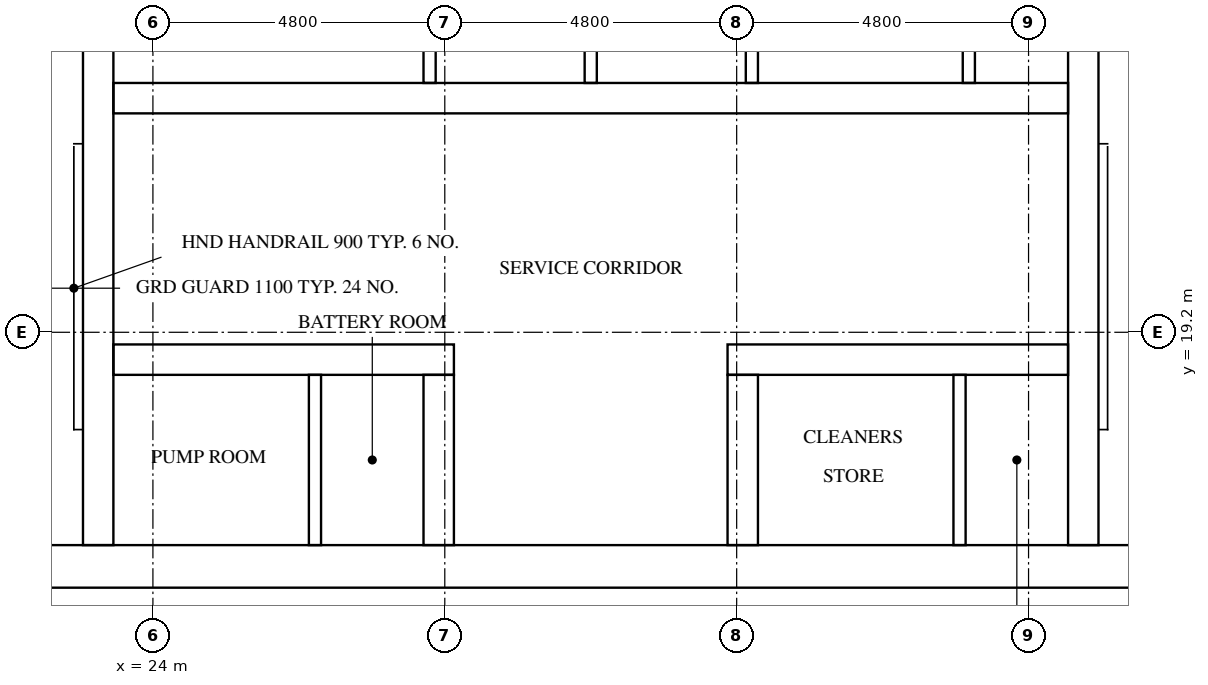
"""IFC4 building model, lengths in metres.
Left out: names, types, materials, properties, quantities, classifications, styles, units other than length and angle.
Written with IfcOpenShell. Run it as: python <this file> out.ifc"""

import sys

from ifc_helpers import new_model, si_unit, direction, frame, frame_2d, origin, place, context, subcontext, project, spatial, rectangle, extrude, element, fill, save


model = new_model("IFC4")
c1 = context("Model", 3, precision=1e-05, world=origin(), true_north=direction((0.0, 1.0)))
c2 = subcontext(c1, "Body", "Model", "MODEL_VIEW")
j1 = project(units=[si_unit("LENGTHUNIT", "METRE"), si_unit("PLANEANGLEUNIT", "RADIAN")], contexts=[c1])
p1 = place(None, origin())
s1 = spatial("IfcSite", under=j1, at=p1, CompositionType="ELEMENT")
p2 = place(p1, origin())
s2 = spatial("IfcBuilding", under=s1, at=p2, CompositionType="ELEMENT")
p3 = place(p2, frame((0.0, 0.0, 203.4)))
s3 = spatial("IfcBuildingStorey", under=s2, at=p3, CompositionType="ELEMENT", Elevation=203.4)
p4 = place(p3, frame((15.0, 15.35, 0.0), z_axis=(0.0, 0.0, 1.0), x_axis=(1.0, 0.0, 0.0)))
e1 = element("IfcWall", 1, at=p4, inside=s3, PredefinedType="SHEAR", context=c2, shape_type="SweptSolid", body=[
    extrude(rectangle(XDim=32.4, YDim=0.7, at=frame_2d((16.2, 0.0))), origin(), (0.0, 0.0, 1.0), 5.1),
])
p5 = place(p4, frame((15.3, 0.0, 0.0)))
e2 = element("IfcOpeningElement", 2, at=p5, cuts=e1, PredefinedType="OPENING", context=c2, shape_type="SweptSolid", body=[
    extrude(rectangle(XDim=1.8, YDim=2.1, at=frame_2d((0.9, 1.05))), frame((0.0, 0.36, 0.0), z_axis=(0.0, -1.0, 0.0), x_axis=(1.0, 0.0, 0.0)), (0.0, 0.0, 1.0), 0.72),
])
p6 = place(p3, frame((23.1, 15.7, 0.0), z_axis=(0.0, 0.0, 1.0), x_axis=(0.0, 1.0, 0.0)))
e3 = element("IfcWall", 3, at=p6, inside=s3, PredefinedType="SHEAR", context=c2, shape_type="SweptSolid", body=[
    extrude(rectangle(XDim=21.4, YDim=0.5, at=frame_2d((10.7, 0.0))), origin(), (0.0, 0.0, 1.0), 5.1),
])
p7 = place(p3, frame((39.3, 15.7, 0.0), z_axis=(0.0, 0.0, 1.0), x_axis=(0.0, 1.0, 0.0)))
e4 = element("IfcWall", 4, at=p7, inside=s3, PredefinedType="SHEAR", context=c2, shape_type="SweptSolid", body=[
    extrude(rectangle(XDim=8.55, YDim=0.5, at=frame_2d((4.275, 0.0))), origin(), (0.0, 0.0, 1.0), 5.1),
])
p8 = place(p3, frame((23.35, 18.75, 0.0), z_axis=(0.0, 0.0, 1.0), x_axis=(1.0, 0.0, 0.0)))
e5 = element("IfcWall", 5, at=p8, inside=s3, PredefinedType="SHEAR", context=c2, shape_type="SweptSolid", body=[
    extrude(rectangle(XDim=5.6, YDim=0.5, at=frame_2d((2.8, 0.0))), origin(), (0.0, 0.0, 1.0), 5.1),
])
p9 = place(p8, frame((1.107, 0.0, 0.0)))
e6 = element("IfcOpeningElement", 6, at=p9, cuts=e5, PredefinedType="OPENING", context=c2, shape_type="SweptSolid", body=[
    extrude(rectangle(XDim=1.0, YDim=2.1, at=frame_2d((0.5, 1.05))), frame((0.0, 0.26, 0.0), z_axis=(0.0, -1.0, 0.0), x_axis=(1.0, 0.0, 0.0)), (0.0, 0.0, 1.0), 0.52),
])
p10 = place(p8, frame((3.758, 0.0, 0.0)))
e7 = element("IfcOpeningElement", 7, at=p10, cuts=e5, PredefinedType="OPENING", context=c2, shape_type="SweptSolid", body=[
    extrude(rectangle(XDim=1.0, YDim=2.1, at=frame_2d((0.5, 1.05))), frame((0.0, 0.26, 0.0), z_axis=(0.0, -1.0, 0.0), x_axis=(1.0, 0.0, 0.0)), (0.0, 0.0, 1.0), 0.52),
])
p11 = place(p3, frame((33.45, 18.75, 0.0), z_axis=(0.0, 0.0, 1.0), x_axis=(1.0, 0.0, 0.0)))
e8 = element("IfcWall", 8, at=p11, inside=s3, PredefinedType="SHEAR", context=c2, shape_type="SweptSolid", body=[
    extrude(rectangle(XDim=5.6, YDim=0.5, at=frame_2d((2.8, 0.0))), origin(), (0.0, 0.0, 1.0), 5.1),
])
p12 = place(p11, frame((1.607, 0.0, 0.0)))
e9 = element("IfcOpeningElement", 9, at=p12, cuts=e8, PredefinedType="OPENING", context=c2, shape_type="SweptSolid", body=[
    extrude(rectangle(XDim=1.0, YDim=2.1, at=frame_2d((0.5, 1.05))), frame((0.0, 0.26, 0.0), z_axis=(0.0, -1.0, 0.0), x_axis=(1.0, 0.0, 0.0)), (0.0, 0.0, 1.0), 0.52),
])
p13 = place(p11, frame((4.258, 0.0, 0.0)))
e10 = element("IfcOpeningElement", 10, at=p13, cuts=e8, PredefinedType="OPENING", context=c2, shape_type="SweptSolid", body=[
    extrude(rectangle(XDim=1.0, YDim=2.1, at=frame_2d((0.5, 1.05))), frame((0.0, 0.26, 0.0), z_axis=(0.0, -1.0, 0.0), x_axis=(1.0, 0.0, 0.0)), (0.0, 0.0, 1.0), 0.52),
])
p14 = place(p3, frame((23.35, 23.05, 0.0), z_axis=(0.0, 0.0, 1.0), x_axis=(1.0, 0.0, 0.0)))
e11 = element("IfcWall", 11, at=p14, inside=s3, PredefinedType="SHEAR", context=c2, shape_type="SweptSolid", body=[
    extrude(rectangle(XDim=15.7, YDim=0.5, at=frame_2d((7.85, 0.0))), origin(), (0.0, 0.0, 1.0), 5.1),
])
p15 = place(p14, frame((2.05, 0.0, 0.0)))
e12 = element("IfcOpeningElement", 12, at=p15, cuts=e11, PredefinedType="OPENING", context=c2, shape_type="SweptSolid", body=[
    extrude(rectangle(XDim=1.0, YDim=2.1, at=frame_2d((0.5, 1.05))), frame((0.0, 0.26, 0.0), z_axis=(0.0, -1.0, 0.0), x_axis=(1.0, 0.0, 0.0)), (0.0, 0.0, 1.0), 0.52),
])
p16 = place(p14, frame((11.784, 0.0, 0.0)))
e13 = element("IfcOpeningElement", 13, at=p16, cuts=e11, PredefinedType="OPENING", context=c2, shape_type="SweptSolid", body=[
    extrude(rectangle(XDim=1.0, YDim=2.1, at=frame_2d((0.5, 1.05))), frame((0.0, 0.26, 0.0), z_axis=(0.0, -1.0, 0.0), x_axis=(1.0, 0.0, 0.0)), (0.0, 0.0, 1.0), 0.52),
])
p17 = place(p14, frame((14.434, 0.0, 0.0)))
e14 = element("IfcOpeningElement", 14, at=p17, cuts=e11, PredefinedType="OPENING", context=c2, shape_type="SweptSolid", body=[
    extrude(rectangle(XDim=1.0, YDim=2.1, at=frame_2d((0.5, 1.05))), frame((0.0, 0.26, 0.0), z_axis=(0.0, -1.0, 0.0), x_axis=(1.0, 0.0, 0.0)), (0.0, 0.0, 1.0), 0.52),
])
for number, where, z_axis, x_axis in (
    (15, (28.7, 15.7, 0.0), (0.0, 0.0, 1.0), (0.0, 1.0, 0.0)),
    (16, (33.7, 15.7, 0.0), (0.0, 0.0, 1.0), (0.0, 1.0, 0.0)),
):
    element("IfcWall", number, at=place(p3, frame(where, z_axis=z_axis, x_axis=x_axis)), inside=s3, PredefinedType="SHEAR", context=c2, shape_type="SweptSolid", body=[
        extrude(rectangle(XDim=2.8, YDim=0.5, at=frame_2d((1.4, 0.0))), origin(), (0.0, 0.0, 1.0), 5.1),
    ])
for number, where, z_axis, x_axis in (
    (17, (28.55, 23.3, 0.0), (0.0, 0.0, 1.0), (0.0, 1.0, 0.0)),
    (18, (31.2, 23.3, 0.0), (0.0, 0.0, 1.0), (0.0, 1.0, 0.0)),
    (19, (33.85, 23.3, 0.0), (0.0, 0.0, 1.0), (0.0, 1.0, 0.0)),
):
    element("IfcWall", number, at=place(p3, frame(where, z_axis=z_axis, x_axis=x_axis)), inside=s3, PredefinedType="SOLIDWALL", context=c2, shape_type="SweptSolid", body=[
        extrude(rectangle(XDim=2.6, YDim=0.2, at=frame_2d((1.3, 0.0))), origin(), (0.0, 0.0, 1.0), 5.1),
    ])
p18 = place(p3, frame((37.418, 23.3, 0.0), z_axis=(0.0, 0.0, 1.0), x_axis=(0.0, 1.0, 0.0)))
e20 = element("IfcWall", 20, at=p18, inside=s3, PredefinedType="PARTITIONING", context=c2, shape_type="SweptSolid", body=[
    extrude(rectangle(XDim=2.6, YDim=0.2, at=frame_2d((1.3, 0.0))), origin(), (0.0, 0.0, 1.0), 5.1),
])
for number, where, z_axis, x_axis in (
    (21, (26.665, 15.7, 0.0), (0.0, 0.0, 1.0), (0.0, 1.0, 0.0)),
    (22, (37.265, 15.7, 0.0), (0.0, 0.0, 1.0), (0.0, 1.0, 0.0)),
):
    element("IfcWall", number, at=place(p3, frame(where, z_axis=z_axis, x_axis=x_axis)), inside=s3, PredefinedType="PARTITIONING", context=c2, shape_type="SweptSolid", body=[
        extrude(rectangle(XDim=2.8, YDim=0.2, at=frame_2d((1.4, 0.0))), origin(), (0.0, 0.0, 1.0), 5.1),
    ])
p19 = place(p5, frame((1.8, 0.0, 0.0), z_axis=(0.0, 0.0, 1.0), x_axis=(-1.0, 0.0, 0.0)))
e23 = element("IfcDoor", 23, at=p19, inside=s3, OperationType="DOUBLE_DOOR_SINGLE_SWING", PredefinedType="DOOR", context=c2, shape_type="SweptSolid", body=[
    extrude(rectangle(XDim=1.8, YDim=2.1, at=frame_2d((0.9, 1.05))), frame((0.0, 0.025, 0.0), z_axis=(0.0, -1.0, 0.0), x_axis=(1.0, 0.0, 0.0)), (0.0, 0.0, 1.0), 0.05),
])
fill(e2, e23)
p20 = place(p15, frame((1.0, 0.0, 0.0), z_axis=(0.0, 0.0, 1.0), x_axis=(-1.0, 0.0, 0.0)))
e24 = element("IfcDoor", 24, at=p20, inside=s3, OperationType="SINGLE_SWING_RIGHT", PredefinedType="DOOR", context=c2, shape_type="SweptSolid", body=[
    extrude(rectangle(XDim=1.0, YDim=2.1, at=frame_2d((0.5, 1.05))), frame((0.0, 0.025, 0.0), z_axis=(0.0, -1.0, 0.0), x_axis=(1.0, 0.0, 0.0)), (0.0, 0.0, 1.0), 0.05),
])
fill(e12, e24)
p21 = place(p16, frame((1.0, 0.0, 0.0), z_axis=(0.0, 0.0, 1.0), x_axis=(-1.0, 0.0, 0.0)))
e25 = element("IfcDoor", 25, at=p21, inside=s3, OperationType="SINGLE_SWING_LEFT", PredefinedType="DOOR", context=c2, shape_type="SweptSolid", body=[
    extrude(rectangle(XDim=1.0, YDim=2.1, at=frame_2d((0.5, 1.05))), frame((0.0, 0.025, 0.0), z_axis=(0.0, -1.0, 0.0), x_axis=(1.0, 0.0, 0.0)), (0.0, 0.0, 1.0), 0.05),
])
fill(e13, e25)
p22 = place(p17, frame((1.0, 0.0, 0.0), z_axis=(0.0, 0.0, 1.0), x_axis=(-1.0, 0.0, 0.0)))
e26 = element("IfcDoor", 26, at=p22, inside=s3, OperationType="SINGLE_SWING_RIGHT", PredefinedType="DOOR", context=c2, shape_type="SweptSolid", body=[
    extrude(rectangle(XDim=1.0, YDim=2.1, at=frame_2d((0.5, 1.05))), frame((0.0, 0.025, 0.0), z_axis=(0.0, -1.0, 0.0), x_axis=(1.0, 0.0, 0.0)), (0.0, 0.0, 1.0), 0.05),
])
fill(e14, e26)
p23 = place(p9, origin())
e27 = element("IfcDoor", 27, at=p23, inside=s3, OperationType="SINGLE_SWING_LEFT", PredefinedType="DOOR", context=c2, shape_type="SweptSolid", body=[
    extrude(rectangle(XDim=1.0, YDim=2.1, at=frame_2d((0.5, 1.05))), frame((0.0, 0.025, 0.0), z_axis=(0.0, -1.0, 0.0), x_axis=(1.0, 0.0, 0.0)), (0.0, 0.0, 1.0), 0.05),
])
fill(e6, e27)
p24 = place(p10, origin())
e28 = element("IfcDoor", 28, at=p24, inside=s3, OperationType="SINGLE_SWING_RIGHT", PredefinedType="DOOR", context=c2, shape_type="SweptSolid", body=[
    extrude(rectangle(XDim=1.0, YDim=2.1, at=frame_2d((0.5, 1.05))), frame((0.0, 0.025, 0.0), z_axis=(0.0, -1.0, 0.0), x_axis=(1.0, 0.0, 0.0)), (0.0, 0.0, 1.0), 0.05),
])
fill(e7, e28)
p25 = place(p12, origin())
e29 = element("IfcDoor", 29, at=p25, inside=s3, OperationType="SINGLE_SWING_LEFT", PredefinedType="DOOR", context=c2, shape_type="SweptSolid", body=[
    extrude(rectangle(XDim=1.0, YDim=2.1, at=frame_2d((0.5, 1.05))), frame((0.0, 0.025, 0.0), z_axis=(0.0, -1.0, 0.0), x_axis=(1.0, 0.0, 0.0)), (0.0, 0.0, 1.0), 0.05),
])
fill(e9, e29)
p26 = place(p13, origin())
e30 = element("IfcDoor", 30, at=p26, inside=s3, OperationType="SINGLE_SWING_RIGHT", PredefinedType="DOOR", context=c2, shape_type="SweptSolid", body=[
    extrude(rectangle(XDim=1.0, YDim=2.1, at=frame_2d((0.5, 1.05))), frame((0.0, 0.025, 0.0), z_axis=(0.0, -1.0, 0.0), x_axis=(1.0, 0.0, 0.0)), (0.0, 0.0, 1.0), 0.05),
])
fill(e10, e30)
save(model, sys.argv[1])
